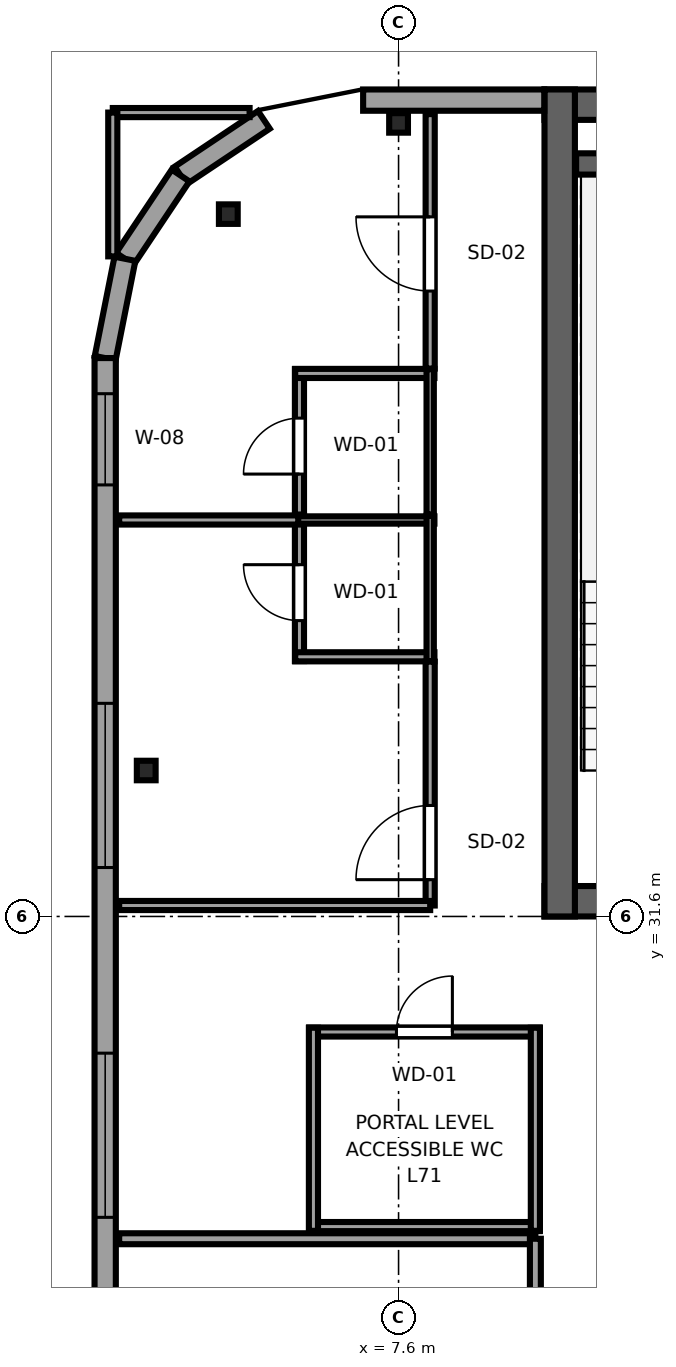
"""IFC4 building model, lengths in metres.
Left out: names, types, materials, properties, quantities, classifications, styles, units other than length and angle.
Written with IfcOpenShell. Run it as: python <this file> out.ifc"""

import sys

from ifc_helpers import new_model, si_unit, direction, frame, frame_2d, origin, origin_2d, place, context, subcontext, project, spatial, rectangle, i_section, extrude, source, transform, mapped, element, fill, save


model = new_model("IFC4")
c1 = context("Model", 3, precision=1e-05, world=origin(), true_north=direction((0.0, 1.0)))
c2 = subcontext(c1, "Body", "Model", "MODEL_VIEW")
j1 = project(units=[si_unit("LENGTHUNIT", "METRE"), si_unit("PLANEANGLEUNIT", "RADIAN")], contexts=[c1])
p1 = place(None, origin())
s1 = spatial("IfcSite", under=j1, at=p1, CompositionType="ELEMENT")
p2 = place(p1, origin())
s2 = spatial("IfcBuilding", under=s1, at=p2, CompositionType="ELEMENT")
p3 = place(p2, frame((0.0, 0.0, 266.5)))
s3 = spatial("IfcBuildingStorey", under=s2, at=p3, CompositionType="ELEMENT", Elevation=266.5)
p4 = place(p3, frame((10.0, 31.85, 0.0), z_axis=(0.0, 0.0, 1.0), x_axis=(1.0, 0.0, 0.0)))
e1 = element("IfcWall", 1, at=p4, inside=s3, PredefinedType="SHEAR", context=c2, shape_type="SweptSolid", body=[
    extrude(rectangle(XDim=26.0, YDim=0.5, at=frame_2d((13.0, 0.0))), origin(), (0.0, 0.0, 1.0), 3.55),
])
p5 = place(p4, frame((7.45, 0.0, 0.0), z_axis=(0.0, 0.0, 1.0), x_axis=(-1.0, 0.0, 0.0)))
e2 = element("IfcOpeningElement", 2, at=p5, cuts=e1, PredefinedType="OPENING", context=c2, shape_type="SweptSolid", body=[
    extrude(rectangle(XDim=1.5, YDim=2.04, at=frame_2d((0.75, 1.02))), frame((0.0, 0.26, 0.0), z_axis=(0.0, -1.0, 0.0), x_axis=(1.0, 0.0, 0.0)), (0.0, 0.0, 1.0), 0.52),
])
p6 = place(p4, frame((13.75, 0.0, 0.0), z_axis=(0.0, 0.0, 1.0), x_axis=(-1.0, 0.0, 0.0)))
e3 = element("IfcOpeningElement", 3, at=p6, cuts=e1, PredefinedType="OPENING", context=c2, shape_type="SweptSolid", body=[
    extrude(rectangle(XDim=1.5, YDim=2.04, at=frame_2d((0.75, 1.02))), frame((0.0, 0.26, 0.0), z_axis=(0.0, -1.0, 0.0), x_axis=(1.0, 0.0, 0.0)), (0.0, 0.0, 1.0), 0.52),
])
p7 = place(p4, frame((20.05, 0.0, 0.0), z_axis=(0.0, 0.0, 1.0), x_axis=(-1.0, 0.0, 0.0)))
e4 = element("IfcOpeningElement", 4, at=p7, cuts=e1, PredefinedType="OPENING", context=c2, shape_type="SweptSolid", body=[
    extrude(rectangle(XDim=1.5, YDim=2.04, at=frame_2d((0.75, 1.02))), frame((0.0, 0.26, 0.0), z_axis=(0.0, -1.0, 0.0), x_axis=(1.0, 0.0, 0.0)), (0.0, 0.0, 1.0), 0.52),
])
p8 = place(p3, frame((10.0, 44.95, 0.0), z_axis=(0.0, 0.0, 1.0), x_axis=(1.0, 0.0, 0.0)))
e5 = element("IfcWall", 5, at=p8, inside=s3, PredefinedType="SHEAR", context=c2, shape_type="SweptSolid", body=[
    extrude(rectangle(XDim=26.0, YDim=0.5, at=frame_2d((13.0, 0.0))), origin(), (0.0, 0.0, 1.0), 3.55),
])
p9 = place(p3, frame((10.25, 31.6, 0.0), z_axis=(0.0, 0.0, 1.0), x_axis=(0.0, 1.0, 0.0)))
e6 = element("IfcWall", 6, at=p9, inside=s3, PredefinedType="SHEAR", context=c2, shape_type="SweptSolid", body=[
    extrude(rectangle(XDim=13.6, YDim=0.5, at=frame_2d((6.8, 0.0))), origin(), (0.0, 0.0, 1.0), 3.55),
])
p10 = place(p3, frame((10.52, 43.975, 0.0), z_axis=(0.0, 0.0, 1.0), x_axis=(1.0, 0.0, 0.0)))
e7 = element("IfcWall", 7, at=p10, inside=s3, PredefinedType="SHEAR", context=c2, shape_type="SweptSolid", body=[
    extrude(rectangle(XDim=3.6, YDim=0.35, at=frame_2d((1.8, 0.0))), origin(), (0.0, 0.0, 1.0), 3.55),
])
m1 = source(origin(), c2, "Body", "SweptSolid", [
    extrude(i_section(OverallWidth=0.309, OverallDepth=0.321, WebThickness=0.014, FlangeThickness=0.022, FilletRadius=0.017, at=origin_2d()), origin(), (0.0, 0.0, 1.0), 3.55),
])
for number, where, z_axis, x_axis in (
    (8, (4.8, 43.15, 0.0), (0.0, 0.0, 1.0), (1.0, 0.0, 0.0)),
    (9, (7.6, 44.65, 0.0), (0.0, 0.0, 1.0), (1.0, 0.0, 0.0)),
    (10, (3.45, 34.0, 0.0), (0.0, 0.0, 1.0), (1.0, 0.0, 0.0)),
):
    element("IfcColumn", number, at=place(p3, frame(where, z_axis=z_axis, x_axis=x_axis)), inside=s3, PredefinedType="COLUMN", context=c2, shape_type="MappedRepresentation", body=[
        mapped(m1, transform((0.0, 0.0, 0.0), x_axis=(1.0, 0.0, 0.0), y_axis=(0.0, 1.0, 0.0), z_axis=(0.0, 0.0, 1.0), scale=1.0)),
    ])
p11 = place(p3, frame((9.996, 45.025, 0.0), z_axis=(0.0, 0.0, 1.0), x_axis=(-1.0, 0.0, 0.0)))
e11 = element("IfcWall", 11, at=p11, inside=s3, PredefinedType="SOLIDWALL", context=c2, shape_type="SweptSolid", body=[
    extrude(rectangle(XDim=2.979, YDim=0.35, at=frame_2d((1.49, 0.0))), origin(), (0.0, 0.0, 1.0), 2.04),
])
for number, where, z_axis, x_axis in (
    (12, (5.385, 44.7, 0.0), (0.0, 0.0, 1.0), (-0.832, -0.556, 0.0)),
    (13, (4.015, 43.785, 0.0), (0.0, 0.0, 1.0), (-0.556, -0.831, 0.0)),
):
    element("IfcWall", number, at=place(p3, frame(where, z_axis=z_axis, x_axis=x_axis)), inside=s3, PredefinedType="SOLIDWALL", context=c2, shape_type="SweptSolid", body=[
        extrude(rectangle(XDim=1.647, YDim=0.35, at=frame_2d((0.824, 0.0))), origin(), (0.0, 0.0, 1.0), 2.78),
    ])
p12 = place(p3, frame((3.1, 42.416, 0.0), z_axis=(0.0, 0.0, 1.0), x_axis=(-0.195044345786, -0.980794424524, 0.0)))
e14 = element("IfcWall", 14, at=p12, inside=s3, PredefinedType="SOLIDWALL", context=c2, shape_type="SweptSolid", body=[
    extrude(rectangle(XDim=1.665, YDim=0.35, at=frame_2d((0.833, 0.0))), origin(), (0.0, 0.0, 1.0), 3.25),
])
p13 = place(p3, frame((2.775, 40.783, 0.0), z_axis=(0.0, 0.0, 1.0), x_axis=(0.0, -1.0, 0.0)))
e15 = element("IfcWall", 15, at=p13, inside=s3, PredefinedType="SOLIDWALL", context=c2, shape_type="SweptSolid", body=[
    extrude(rectangle(XDim=33.766, YDim=0.35, at=frame_2d((16.883, 0.0))), origin(), (0.0, 0.0, 1.0), 3.25),
])
p14 = place(p13, frame((5.678, 0.0, 0.68)))
e16 = element("IfcOpeningElement", 16, at=p14, cuts=e15, PredefinedType="OPENING", context=c2, shape_type="SweptSolid", body=[
    extrude(rectangle(XDim=2.7, YDim=1.95, at=frame_2d((1.35, 0.975))), frame((0.0, 0.185, 0.0), z_axis=(0.0, -1.0, 0.0), x_axis=(1.0, 0.0, 0.0)), (0.0, 0.0, 1.0), 0.37),
])
p15 = place(p13, frame((11.431, 0.0, 0.68)))
e17 = element("IfcOpeningElement", 17, at=p15, cuts=e15, PredefinedType="OPENING", context=c2, shape_type="SweptSolid", body=[
    extrude(rectangle(XDim=2.7, YDim=1.95, at=frame_2d((1.35, 0.975))), frame((0.0, 0.185, 0.0), z_axis=(0.0, -1.0, 0.0), x_axis=(1.0, 0.0, 0.0)), (0.0, 0.0, 1.0), 0.37),
])
p16 = place(p13, frame((15.533, 0.0, 0.68)))
e18 = element("IfcOpeningElement", 18, at=p16, cuts=e15, PredefinedType="OPENING", context=c2, shape_type="SweptSolid", body=[
    extrude(rectangle(XDim=2.7, YDim=1.95, at=frame_2d((1.35, 0.975))), frame((0.0, 0.185, 0.0), z_axis=(0.0, -1.0, 0.0), x_axis=(1.0, 0.0, 0.0)), (0.0, 0.0, 1.0), 0.37),
])
p17 = place(p13, frame((19.635, 0.0, 0.68)))
e19 = element("IfcOpeningElement", 19, at=p17, cuts=e15, PredefinedType="OPENING", context=c2, shape_type="SweptSolid", body=[
    extrude(rectangle(XDim=2.7, YDim=1.95, at=frame_2d((1.35, 0.975))), frame((0.0, 0.185, 0.0), z_axis=(0.0, -1.0, 0.0), x_axis=(1.0, 0.0, 0.0)), (0.0, 0.0, 1.0), 0.37),
])
p18 = place(p13, frame((31.279, 0.0, 0.62)))
e20 = element("IfcOpeningElement", 20, at=p18, cuts=e15, PredefinedType="OPENING", context=c2, shape_type="SweptSolid", body=[
    extrude(rectangle(XDim=1.5, YDim=1.55, at=frame_2d((0.75, 0.775))), frame((0.0, 0.185, 0.0), z_axis=(0.0, -1.0, 0.0), x_axis=(1.0, 0.0, 0.0)), (0.0, 0.0, 1.0), 0.37),
])
p19 = place(p13, frame((27.783, 0.0, 0.62)))
e21 = element("IfcOpeningElement", 21, at=p19, cuts=e15, PredefinedType="OPENING", context=c2, shape_type="SweptSolid", body=[
    extrude(rectangle(XDim=1.5, YDim=1.55, at=frame_2d((0.75, 0.775))), frame((0.0, 0.185, 0.0), z_axis=(0.0, -1.0, 0.0), x_axis=(1.0, 0.0, 0.0)), (0.0, 0.0, 1.0), 0.37),
])
p20 = place(p13, frame((24.083, 0.0, 0.62)))
e22 = element("IfcOpeningElement", 22, at=p20, cuts=e15, PredefinedType="OPENING", context=c2, shape_type="SweptSolid", body=[
    extrude(rectangle(XDim=1.5, YDim=1.55, at=frame_2d((0.75, 0.775))), frame((0.0, 0.185, 0.0), z_axis=(0.0, -1.0, 0.0), x_axis=(1.0, 0.0, 0.0)), (0.0, 0.0, 1.0), 0.37),
])
p21 = place(p13, frame((0.586, 0.0, 0.62)))
e23 = element("IfcOpeningElement", 23, at=p21, cuts=e15, PredefinedType="OPENING", context=c2, shape_type="SweptSolid", body=[
    extrude(rectangle(XDim=1.5, YDim=1.55, at=frame_2d((0.75, 0.775))), frame((0.0, 0.185, 0.0), z_axis=(0.0, -1.0, 0.0), x_axis=(1.0, 0.0, 0.0)), (0.0, 0.0, 1.0), 0.37),
])
p22 = place(p3, frame((5.97, 35.8, 0.0), z_axis=(0.0, 0.0, 1.0), x_axis=(0.0, 1.0, 0.0)))
e24 = element("IfcWall", 24, at=p22, inside=s3, PredefinedType="PARTITIONING", context=c2, shape_type="SweptSolid", body=[
    extrude(rectangle(XDim=2.39, YDim=0.15, at=frame_2d((1.195, 0.0))), origin(), (0.0, 0.0, 1.0), 3.25),
])
p23 = place(p22, frame((0.665, 0.0, 0.0)))
e25 = element("IfcOpeningElement", 25, at=p23, cuts=e24, PredefinedType="OPENING", context=c2, shape_type="SweptSolid", body=[
    extrude(rectangle(XDim=0.92, YDim=2.01, at=frame_2d((0.46, 1.005))), frame((0.0, 0.085, 0.0), z_axis=(0.0, -1.0, 0.0), x_axis=(1.0, 0.0, 0.0)), (0.0, 0.0, 1.0), 0.17),
])
p24 = place(p3, frame((5.9, 35.87, 0.0), z_axis=(0.0, 0.0, 1.0), x_axis=(1.0, 0.0, 0.0)))
e26 = element("IfcWall", 26, at=p24, inside=s3, PredefinedType="PARTITIONING", context=c2, shape_type="SweptSolid", body=[
    extrude(rectangle(XDim=2.29, YDim=0.15, at=frame_2d((1.145, 0.0))), origin(), (0.0, 0.0, 1.0), 3.25),
])
p25 = place(p3, frame((5.9, 38.12, 0.0), z_axis=(0.0, 0.0, 1.0), x_axis=(1.0, 0.0, 0.0)))
e27 = element("IfcWall", 27, at=p25, inside=s3, PredefinedType="PLUMBINGWALL", context=c2, shape_type="SweptSolid", body=[
    extrude(rectangle(XDim=2.29, YDim=0.12, at=frame_2d((1.145, 0.0))), origin(), (0.0, 0.0, 1.0), 3.25),
])
p26 = place(p3, frame((8.12, 35.8, 0.0), z_axis=(0.0, 0.0, 1.0), x_axis=(0.0, 1.0, 0.0)))
e28 = element("IfcWall", 28, at=p26, inside=s3, PredefinedType="PLUMBINGWALL", context=c2, shape_type="SweptSolid", body=[
    extrude(rectangle(XDim=2.39, YDim=0.12, at=frame_2d((1.195, 0.0))), origin(), (0.0, 0.0, 1.0), 3.25),
])
p27 = place(p3, frame((5.97, 38.21, 0.0), z_axis=(0.0, 0.0, 1.0), x_axis=(0.0, 1.0, 0.0)))
e29 = element("IfcWall", 29, at=p27, inside=s3, PredefinedType="PARTITIONING", context=c2, shape_type="SweptSolid", body=[
    extrude(rectangle(XDim=2.39, YDim=0.15, at=frame_2d((1.195, 0.0))), origin(), (0.0, 0.0, 1.0), 3.25),
])
p28 = place(p27, frame((0.665, 0.0, 0.0)))
e30 = element("IfcOpeningElement", 30, at=p28, cuts=e29, PredefinedType="OPENING", context=c2, shape_type="SweptSolid", body=[
    extrude(rectangle(XDim=0.92, YDim=2.01, at=frame_2d((0.46, 1.005))), frame((0.0, 0.085, 0.0), z_axis=(0.0, -1.0, 0.0), x_axis=(1.0, 0.0, 0.0)), (0.0, 0.0, 1.0), 0.17),
])
p29 = place(p3, frame((5.9, 40.53, 0.0), z_axis=(0.0, 0.0, 1.0), x_axis=(1.0, 0.0, 0.0)))
e31 = element("IfcWall", 31, at=p29, inside=s3, PredefinedType="PARTITIONING", context=c2, shape_type="SweptSolid", body=[
    extrude(rectangle(XDim=2.29, YDim=0.15, at=frame_2d((1.145, 0.0))), origin(), (0.0, 0.0, 1.0), 3.25),
])
p30 = place(p3, frame((8.12, 38.21, 0.0), z_axis=(0.0, 0.0, 1.0), x_axis=(0.0, 1.0, 0.0)))
e32 = element("IfcWall", 32, at=p30, inside=s3, PredefinedType="PLUMBINGWALL", context=c2, shape_type="SweptSolid", body=[
    extrude(rectangle(XDim=2.39, YDim=0.12, at=frame_2d((1.195, 0.0))), origin(), (0.0, 0.0, 1.0), 3.25),
])
p31 = place(p3, frame((3.005, 26.3, 0.0), z_axis=(0.0, 0.0, 1.0), x_axis=(1.0, 0.0, 0.0)))
e33 = element("IfcWall", 33, at=p31, inside=s3, PredefinedType="PARTITIONING", context=c2, shape_type="SweptSolid", body=[
    extrude(rectangle(XDim=6.845, YDim=0.18, at=frame_2d((3.423, 0.0))), origin(), (0.0, 0.0, 1.0), 3.25),
])
p32 = place(p3, frame((9.85, 22.0, 0.0), z_axis=(0.0, 0.0, 1.0), x_axis=(0.0, 1.0, 0.0)))
e34 = element("IfcWall", 34, at=p32, inside=s3, PredefinedType="PARTITIONING", context=c2, shape_type="SweptSolid", body=[
    extrude(rectangle(XDim=4.3, YDim=0.18, at=frame_2d((2.15, 0.0))), origin(), (0.0, 0.0, 1.0), 3.25),
])
p33 = place(p32, frame((0.375, 0.0, 0.0)))
e35 = element("IfcOpeningElement", 35, at=p33, cuts=e34, PredefinedType="OPENING", context=c2, shape_type="SweptSolid", body=[
    extrude(rectangle(XDim=1.65, YDim=2.15, at=frame_2d((0.825, 1.075))), frame((0.0, 0.1, 0.0), z_axis=(0.0, -1.0, 0.0), x_axis=(1.0, 0.0, 0.0)), (0.0, 0.0, 1.0), 0.2),
])
p34 = place(p3, frame((6.13, 26.5, 0.0), z_axis=(0.0, 0.0, 1.0), x_axis=(1.0, 0.0, 0.0)))
e36 = element("IfcWall", 36, at=p34, inside=s3, PredefinedType="PARTITIONING", context=c2, shape_type="SweptSolid", body=[
    extrude(rectangle(XDim=3.79, YDim=0.15, at=frame_2d((1.895, 0.0))), origin(), (0.0, 0.0, 1.0), 3.25),
])
p35 = place(p3, frame((6.13, 29.7, 0.0), z_axis=(0.0, 0.0, 1.0), x_axis=(1.0, 0.0, 0.0)))
e37 = element("IfcWall", 37, at=p35, inside=s3, PredefinedType="PARTITIONING", context=c2, shape_type="SweptSolid", body=[
    extrude(rectangle(XDim=3.79, YDim=0.15, at=frame_2d((1.895, 0.0))), origin(), (0.0, 0.0, 1.0), 3.25),
])
p36 = place(p35, frame((1.435, 0.0, 0.0)))
e38 = element("IfcOpeningElement", 38, at=p36, cuts=e37, PredefinedType="OPENING", context=c2, shape_type="SweptSolid", body=[
    extrude(rectangle(XDim=0.92, YDim=2.01, at=frame_2d((0.46, 1.005))), frame((0.0, 0.085, 0.0), z_axis=(0.0, -1.0, 0.0), x_axis=(1.0, 0.0, 0.0)), (0.0, 0.0, 1.0), 0.17),
])
for number, where, z_axis, x_axis in (
    (39, (6.2, 26.43, 0.0), (0.0, 0.0, 1.0), (0.0, 1.0, 0.0)),
    (40, (9.85, 26.43, 0.0), (0.0, 0.0, 1.0), (0.0, 1.0, 0.0)),
):
    element("IfcWall", number, at=place(p3, frame(where, z_axis=z_axis, x_axis=x_axis)), inside=s3, PredefinedType="PARTITIONING", context=c2, shape_type="SweptSolid", body=[
        extrude(rectangle(XDim=3.34, YDim=0.15, at=frame_2d((1.67, 0.0))), origin(), (0.0, 0.0, 1.0), 3.25),
    ])
p37 = place(p3, frame((8.12, 31.78, 0.0), z_axis=(0.0, 0.0, 1.0), x_axis=(0.0, 1.0, 0.0)))
e41 = element("IfcWall", 41, at=p37, inside=s3, PredefinedType="PARTITIONING", context=c2, shape_type="SweptSolid", body=[
    extrude(rectangle(XDim=4.01, YDim=0.15, at=frame_2d((2.005, 0.0))), origin(), (0.0, 0.0, 1.0), 3.25),
])
p38 = place(p37, frame((0.425, 0.0, 0.0)))
e42 = element("IfcOpeningElement", 42, at=p38, cuts=e41, PredefinedType="OPENING", context=c2, shape_type="SweptSolid", body=[
    extrude(rectangle(XDim=1.22, YDim=2.08, at=frame_2d((0.61, 1.04))), frame((0.0, 0.085, 0.0), z_axis=(0.0, -1.0, 0.0), x_axis=(1.0, 0.0, 0.0)), (0.0, 0.0, 1.0), 0.17),
])
p39 = place(p3, frame((3.005, 31.78, 0.0), z_axis=(0.0, 0.0, 1.0), x_axis=(1.0, 0.0, 0.0)))
e43 = element("IfcWall", 43, at=p39, inside=s3, PredefinedType="PARTITIONING", context=c2, shape_type="SweptSolid", body=[
    extrude(rectangle(XDim=5.115, YDim=0.15, at=frame_2d((2.558, 0.0))), origin(), (0.0, 0.0, 1.0), 3.25),
])
p40 = place(p3, frame((3.005, 38.12, 0.0), z_axis=(0.0, 0.0, 1.0), x_axis=(1.0, 0.0, 0.0)))
e44 = element("IfcWall", 44, at=p40, inside=s3, PredefinedType="PARTITIONING", context=c2, shape_type="SweptSolid", body=[
    extrude(rectangle(XDim=2.945, YDim=0.15, at=frame_2d((1.473, 0.0))), origin(), (0.0, 0.0, 1.0), 3.25),
])
p41 = place(p3, frame((8.12, 40.61, 0.0), z_axis=(0.0, 0.0, 1.0), x_axis=(0.0, 1.0, 0.0)))
e45 = element("IfcWall", 45, at=p41, inside=s3, PredefinedType="PARTITIONING", context=c2, shape_type="SweptSolid", body=[
    extrude(rectangle(XDim=4.185, YDim=0.15, at=frame_2d((2.092, 0.0))), origin(), (0.0, 0.0, 1.0), 3.25),
])
p42 = place(p41, frame((1.275, 0.0, 0.0)))
e46 = element("IfcOpeningElement", 46, at=p42, cuts=e45, PredefinedType="OPENING", context=c2, shape_type="SweptSolid", body=[
    extrude(rectangle(XDim=1.22, YDim=2.08, at=frame_2d((0.61, 1.04))), frame((0.0, 0.085, 0.0), z_axis=(0.0, -1.0, 0.0), x_axis=(1.0, 0.0, 0.0)), (0.0, 0.0, 1.0), 0.17),
])
p43 = place(p3, frame((2.9, 44.82, 0.0), z_axis=(0.0, 0.0, 1.0), x_axis=(1.0, 0.0, 0.0)))
e47 = element("IfcWall", 47, at=p43, inside=s3, PredefinedType="PARTITIONING", context=c2, shape_type="SweptSolid", body=[
    extrude(rectangle(XDim=2.25, YDim=0.15, at=frame_2d((1.125, 0.0))), origin(), (0.0, 0.0, 1.0), 3.25),
])
p44 = place(p3, frame((2.9, 42.455, 0.0), z_axis=(0.0, 0.0, 1.0), x_axis=(0.0, 1.0, 0.0)))
e48 = element("IfcWall", 48, at=p44, inside=s3, PredefinedType="PARTITIONING", context=c2, shape_type="SweptSolid", body=[
    extrude(rectangle(XDim=2.365, YDim=0.15, at=frame_2d((1.183, 0.0))), origin(), (0.0, 0.0, 1.0), 3.25),
])
m2 = source(origin(), c2, "Body", "SweptSolid", [
    extrude(rectangle(XDim=2.7, YDim=1.95, at=frame_2d((1.35, 0.975))), frame((0.0, 0.09, 0.0), z_axis=(0.0, -1.0, 0.0), x_axis=(1.0, 0.0, 0.0)), (0.0, 0.0, 1.0), 0.06),
])
p45 = place(p14, origin())
e49 = element("IfcWindow", 49, at=p45, inside=s3, PartitioningType="TRIPLE_PANEL_HORIZONTAL", PredefinedType="WINDOW", context=c2, shape_type="MappedRepresentation", body=[
    mapped(m2, transform((0.0, 0.0, 0.0), x_axis=(1.0, 0.0, 0.0), y_axis=(0.0, 1.0, 0.0), z_axis=(0.0, 0.0, 1.0), scale=1.0)),
])
fill(e16, e49)
p46 = place(p15, origin())
e50 = element("IfcWindow", 50, at=p46, inside=s3, PartitioningType="TRIPLE_PANEL_HORIZONTAL", PredefinedType="WINDOW", context=c2, shape_type="MappedRepresentation", body=[
    mapped(m2, transform((0.0, 0.0, 0.0), x_axis=(1.0, 0.0, 0.0), y_axis=(0.0, 1.0, 0.0), z_axis=(0.0, 0.0, 1.0), scale=1.0)),
])
fill(e17, e50)
m3 = source(origin(), c2, "Body", "SweptSolid", [
    extrude(rectangle(XDim=1.5, YDim=1.55, at=frame_2d((0.75, 0.775))), frame((0.0, 0.09, 0.0), z_axis=(0.0, -1.0, 0.0), x_axis=(1.0, 0.0, 0.0)), (0.0, 0.0, 1.0), 0.06),
])
p47 = place(p21, origin())
e51 = element("IfcWindow", 51, at=p47, inside=s3, PartitioningType="SINGLE_PANEL", PredefinedType="WINDOW", context=c2, shape_type="MappedRepresentation", body=[
    mapped(m3, transform((0.0, 0.0, 0.0), x_axis=(1.0, 0.0, 0.0), y_axis=(0.0, 1.0, 0.0), z_axis=(0.0, 0.0, 1.0), scale=1.0)),
])
fill(e23, e51)
m4 = source(origin(), c2, "Body", "SweptSolid", [
    extrude(rectangle(XDim=0.92, YDim=2.01, at=frame_2d((0.46, 1.005))), frame((0.0, 0.025, 0.0), z_axis=(0.0, -1.0, 0.0), x_axis=(1.0, 0.0, 0.0)), (0.0, 0.0, 1.0), 0.05),
])
p48 = place(p23, origin())
e52 = element("IfcDoor", 52, at=p48, inside=s3, OperationType="SINGLE_SWING_RIGHT", PredefinedType="DOOR", context=c2, shape_type="MappedRepresentation", body=[
    mapped(m4, transform((0.0, 0.0, 0.0), x_axis=(1.0, 0.0, 0.0), y_axis=(0.0, 1.0, 0.0), z_axis=(0.0, 0.0, 1.0), scale=1.0)),
])
fill(e25, e52)
p49 = place(p28, origin())
e53 = element("IfcDoor", 53, at=p49, inside=s3, OperationType="SINGLE_SWING_LEFT", PredefinedType="DOOR", context=c2, shape_type="MappedRepresentation", body=[
    mapped(m4, transform((0.0, 0.0, 0.0), x_axis=(1.0, 0.0, 0.0), y_axis=(0.0, 1.0, 0.0), z_axis=(0.0, 0.0, 1.0), scale=1.0)),
])
fill(e30, e53)
p50 = place(p36, origin())
e54 = element("IfcDoor", 54, at=p50, inside=s3, OperationType="SINGLE_SWING_RIGHT", PredefinedType="DOOR", context=c2, shape_type="MappedRepresentation", body=[
    mapped(m4, transform((0.0, 0.0, 0.0), x_axis=(1.0, 0.0, 0.0), y_axis=(0.0, 1.0, 0.0), z_axis=(0.0, 0.0, 1.0), scale=1.0)),
])
fill(e38, e54)
m5 = source(origin(), c2, "Body", "SweptSolid", [
    extrude(rectangle(XDim=1.22, YDim=2.08, at=frame_2d((0.61, 1.04))), frame((0.0, 0.025, 0.0), z_axis=(0.0, -1.0, 0.0), x_axis=(1.0, 0.0, 0.0)), (0.0, 0.0, 1.0), 0.05),
])
p51 = place(p38, origin())
e55 = element("IfcDoor", 55, at=p51, inside=s3, OperationType="SINGLE_SWING_LEFT", PredefinedType="DOOR", context=c2, shape_type="MappedRepresentation", body=[
    mapped(m5, transform((0.0, 0.0, 0.0), x_axis=(1.0, 0.0, 0.0), y_axis=(0.0, 1.0, 0.0), z_axis=(0.0, 0.0, 1.0), scale=1.0)),
])
fill(e42, e55)
p52 = place(p42, origin())
e56 = element("IfcDoor", 56, at=p52, inside=s3, OperationType="SINGLE_SWING_RIGHT", PredefinedType="DOOR", context=c2, shape_type="MappedRepresentation", body=[
    mapped(m5, transform((0.0, 0.0, 0.0), x_axis=(1.0, 0.0, 0.0), y_axis=(0.0, 1.0, 0.0), z_axis=(0.0, 0.0, 1.0), scale=1.0)),
])
fill(e46, e56)
save(model, sys.argv[1])
